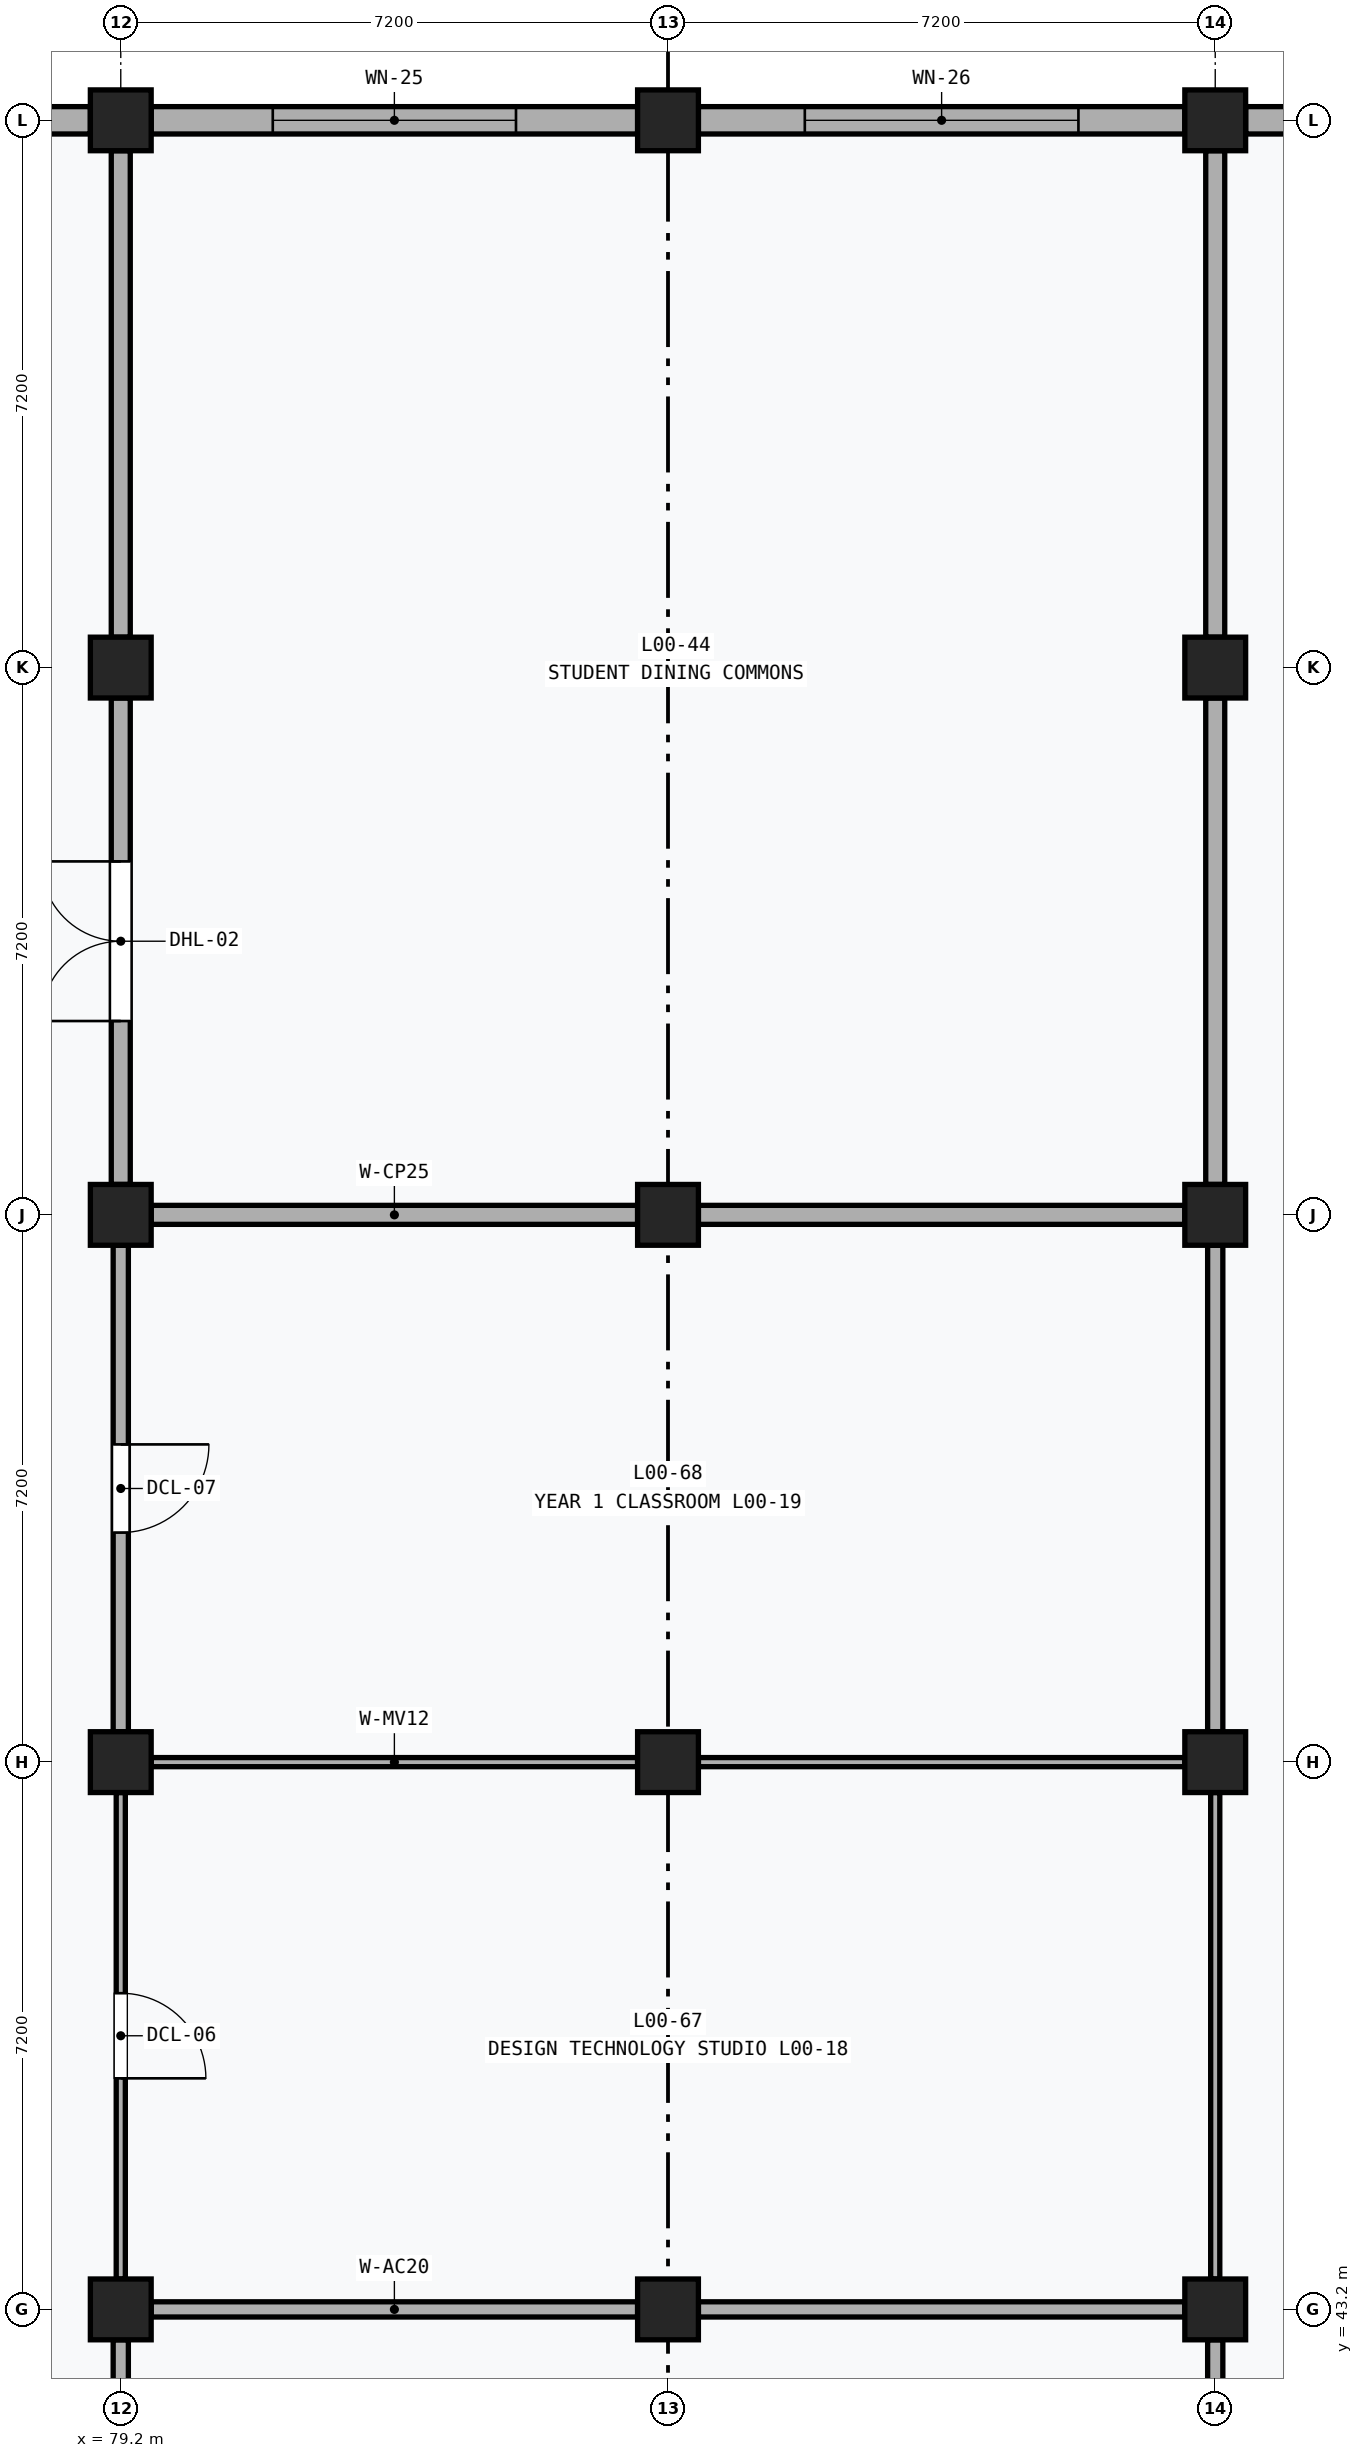
"""IFC4 building model, lengths in metres.
Left out: names, types, materials, properties, quantities, classifications, styles, units other than length and angle.
Written with IfcOpenShell. Run it as: python <this file> out.ifc"""

import sys

from ifc_helpers import new_model, si_unit, direction, frame, frame_2d, origin, origin_2d, place, context, subcontext, project, spatial, rectangle, extrude, element, fill, save


model = new_model("IFC4")
c1 = context("Model", 3, precision=1e-05, world=origin(), true_north=direction((0.0, 1.0)))
c2 = subcontext(c1, "Body", "Model", "MODEL_VIEW")
j1 = project(units=[si_unit("LENGTHUNIT", "METRE"), si_unit("PLANEANGLEUNIT", "RADIAN")], contexts=[c1])
p1 = place(None, origin())
s1 = spatial("IfcSite", under=j1, at=p1, CompositionType="ELEMENT")
p2 = place(p1, origin())
s2 = spatial("IfcBuilding", under=s1, at=p2, CompositionType="ELEMENT")
p3 = place(p2, origin())
s3 = spatial("IfcBuildingStorey", under=s2, at=p3, CompositionType="ELEMENT", Elevation=0.0)
for number, where, z_axis, x_axis in (
    (1, (79.2, 43.2, 0.0), (0.0, 0.0, 1.0), (1.0, 0.0, 0.0)),
    (2, (79.2, 50.4, 0.0), (0.0, 0.0, 1.0), (1.0, 0.0, 0.0)),
    (3, (79.2, 57.6, 0.0), (0.0, 0.0, 1.0), (1.0, 0.0, 0.0)),
    (4, (79.2, 64.8, 0.0), (0.0, 0.0, 1.0), (1.0, 0.0, 0.0)),
    (5, (79.2, 72.0, 0.0), (0.0, 0.0, 1.0), (1.0, 0.0, 0.0)),
    (6, (86.4, 43.2, 0.0), (0.0, 0.0, 1.0), (1.0, 0.0, 0.0)),
    (7, (86.4, 50.4, 0.0), (0.0, 0.0, 1.0), (1.0, 0.0, 0.0)),
    (8, (86.4, 57.6, 0.0), (0.0, 0.0, 1.0), (1.0, 0.0, 0.0)),
    (9, (86.4, 72.0, 0.0), (0.0, 0.0, 1.0), (1.0, 0.0, 0.0)),
    (10, (93.6, 43.2, 0.0), (0.0, 0.0, 1.0), (1.0, 0.0, 0.0)),
    (11, (93.6, 50.4, 0.0), (0.0, 0.0, 1.0), (1.0, 0.0, 0.0)),
    (12, (93.6, 57.6, 0.0), (0.0, 0.0, 1.0), (1.0, 0.0, 0.0)),
    (13, (93.6, 64.8, 0.0), (0.0, 0.0, 1.0), (1.0, 0.0, 0.0)),
    (14, (93.6, 72.0, 0.0), (0.0, 0.0, 1.0), (1.0, 0.0, 0.0)),
):
    element("IfcColumn", number, at=place(p3, frame(where, z_axis=z_axis, x_axis=x_axis)), inside=s3, PredefinedType="COLUMN", context=c2, shape_type="SweptSolid", body=[
        extrude(rectangle(XDim=0.8, YDim=0.8, at=origin_2d()), origin(), (0.0, 0.0, 1.0), 4.8),
    ])
p4 = place(p3, frame((72.25, 72.0, 0.0), z_axis=(0.0, 0.0, 1.0), x_axis=(1.0, 0.0, 0.0)))
e15 = element("IfcWall", 15, at=p4, inside=s3, PredefinedType="SOLIDWALL", context=c2, shape_type="SweptSolid", body=[
    extrude(rectangle(XDim=6.55, YDim=0.36, at=frame_2d((3.275, 0.0))), origin(), (0.0, 0.0, 1.0), 3.89),
])
p5 = place(p4, frame((1.875, 0.0, 0.7)))
e16 = element("IfcOpeningElement", 16, at=p5, cuts=e15, PredefinedType="OPENING", context=c2, shape_type="SweptSolid", body=[
    extrude(rectangle(XDim=2.8, YDim=2.2, at=frame_2d((1.4, 1.1))), frame((0.0, 0.192, 0.0), z_axis=(0.0, -1.0, 0.0), x_axis=(1.0, 0.0, 0.0)), (0.0, 0.0, 1.0), 0.384),
])
p6 = place(p3, frame((79.6, 72.0, 0.0), z_axis=(0.0, 0.0, 1.0), x_axis=(1.0, 0.0, 0.0)))
e17 = element("IfcWall", 17, at=p6, inside=s3, PredefinedType="SOLIDWALL", context=c2, shape_type="SweptSolid", body=[
    extrude(rectangle(XDim=6.4, YDim=0.36, at=frame_2d((3.2, 0.0))), origin(), (0.0, 0.0, 1.0), 3.89),
])
p7 = place(p6, frame((1.6, 0.0, 0.7)))
e18 = element("IfcOpeningElement", 18, at=p7, cuts=e17, PredefinedType="OPENING", context=c2, shape_type="SweptSolid", body=[
    extrude(rectangle(XDim=3.2, YDim=2.2, at=frame_2d((1.6, 1.1))), frame((0.0, 0.192, 0.0), z_axis=(0.0, -1.0, 0.0), x_axis=(1.0, 0.0, 0.0)), (0.0, 0.0, 1.0), 0.384),
])
p8 = place(p3, frame((86.8, 72.0, 0.0), z_axis=(0.0, 0.0, 1.0), x_axis=(1.0, 0.0, 0.0)))
e19 = element("IfcWall", 19, at=p8, inside=s3, PredefinedType="SOLIDWALL", context=c2, shape_type="SweptSolid", body=[
    extrude(rectangle(XDim=6.4, YDim=0.36, at=frame_2d((3.2, 0.0))), origin(), (0.0, 0.0, 1.0), 3.89),
])
p9 = place(p8, frame((1.4, 0.0, 0.7)))
e20 = element("IfcOpeningElement", 20, at=p9, cuts=e19, PredefinedType="OPENING", context=c2, shape_type="SweptSolid", body=[
    extrude(rectangle(XDim=3.6, YDim=2.2, at=frame_2d((1.8, 1.1))), frame((0.0, 0.192, 0.0), z_axis=(0.0, -1.0, 0.0), x_axis=(1.0, 0.0, 0.0)), (0.0, 0.0, 1.0), 0.384),
])
p10 = place(p3, frame((94.0, 72.0, 0.0), z_axis=(0.0, 0.0, 1.0), x_axis=(1.0, 0.0, 0.0)))
e21 = element("IfcWall", 21, at=p10, inside=s3, PredefinedType="SOLIDWALL", context=c2, shape_type="SweptSolid", body=[
    extrude(rectangle(XDim=6.35, YDim=0.36, at=frame_2d((3.175, 0.0))), origin(), (0.0, 0.0, 1.0), 3.89),
])
p11 = place(p10, frame((2.275, 0.0, 0.9)))
e22 = element("IfcOpeningElement", 22, at=p11, cuts=e21, PredefinedType="OPENING", context=c2, shape_type="SweptSolid", body=[
    extrude(rectangle(XDim=1.8, YDim=1.8, at=frame_2d((0.9, 0.9))), frame((0.0, 0.192, 0.0), z_axis=(0.0, -1.0, 0.0), x_axis=(1.0, 0.0, 0.0)), (0.0, 0.0, 1.0), 0.384),
])
p12 = place(p3, frame((79.6, 57.6, 0.0), z_axis=(0.0, 0.0, 1.0), x_axis=(1.0, 0.0, 0.0)))
e23 = element("IfcWall", 23, at=p12, inside=s3, PredefinedType="PARTITIONING", context=c2, shape_type="SweptSolid", body=[
    extrude(rectangle(XDim=6.4, YDim=0.25, at=frame_2d((3.2, 0.0))), origin(), (0.0, 0.0, 1.0), 3.62),
])
p13 = place(p3, frame((79.2, 58.0, 0.0), z_axis=(0.0, 0.0, 1.0), x_axis=(0.0, 1.0, 0.0)))
e24 = element("IfcWall", 24, at=p13, inside=s3, PredefinedType="PARTITIONING", context=c2, shape_type="SweptSolid", body=[
    extrude(rectangle(XDim=6.4, YDim=0.25, at=frame_2d((3.2, 0.0))), origin(), (0.0, 0.0, 1.0), 3.62),
])
p14 = place(p13, frame((2.15, 0.0, 0.0)))
e25 = element("IfcOpeningElement", 25, at=p14, cuts=e24, PredefinedType="OPENING", context=c2, shape_type="SweptSolid", body=[
    extrude(rectangle(XDim=2.1, YDim=2.4, at=frame_2d((1.05, 1.2))), frame((0.0, 0.137, 0.0), z_axis=(0.0, -1.0, 0.0), x_axis=(1.0, 0.0, 0.0)), (0.0, 0.0, 1.0), 0.274),
])
p15 = place(p3, frame((79.2, 65.2, 0.0), z_axis=(0.0, 0.0, 1.0), x_axis=(0.0, 1.0, 0.0)))
e26 = element("IfcWall", 26, at=p15, inside=s3, PredefinedType="PARTITIONING", context=c2, shape_type="SweptSolid", body=[
    extrude(rectangle(XDim=6.4, YDim=0.25, at=frame_2d((3.2, 0.0))), origin(), (0.0, 0.0, 1.0), 3.62),
])
for number, where, z_axis, x_axis in (
    (27, (86.8, 57.6, 0.0), (0.0, 0.0, 1.0), (1.0, 0.0, 0.0)),
    (28, (93.6, 58.0, 0.0), (0.0, 0.0, 1.0), (0.0, 1.0, 0.0)),
):
    element("IfcWall", number, at=place(p3, frame(where, z_axis=z_axis, x_axis=x_axis)), inside=s3, PredefinedType="PARTITIONING", context=c2, shape_type="SweptSolid", body=[
        extrude(rectangle(XDim=6.4, YDim=0.25, at=frame_2d((3.2, 0.0))), origin(), (0.0, 0.0, 1.0), 3.62),
    ])
p16 = place(p3, frame((93.6, 65.2, 0.0), z_axis=(0.0, 0.0, 1.0), x_axis=(0.0, 1.0, 0.0)))
e29 = element("IfcWall", 29, at=p16, inside=s3, PredefinedType="PARTITIONING", context=c2, shape_type="SweptSolid", body=[
    extrude(rectangle(XDim=6.4, YDim=0.25, at=frame_2d((3.2, 0.0))), origin(), (0.0, 0.0, 1.0), 3.62),
])
p17 = place(p3, frame((79.6, 43.2, 0.0), z_axis=(0.0, 0.0, 1.0), x_axis=(1.0, 0.0, 0.0)))
e30 = element("IfcWall", 30, at=p17, inside=s3, PredefinedType="PARTITIONING", context=c2, shape_type="SweptSolid", body=[
    extrude(rectangle(XDim=6.4, YDim=0.2, at=frame_2d((3.2, 0.0))), origin(), (0.0, 0.0, 1.0), 3.62),
])
p18 = place(p3, frame((79.2, 36.4, 0.0), z_axis=(0.0, 0.0, 1.0), x_axis=(0.0, 1.0, 0.0)))
e31 = element("IfcWall", 31, at=p18, inside=s3, PredefinedType="PARTITIONING", context=c2, shape_type="SweptSolid", body=[
    extrude(rectangle(XDim=6.4, YDim=0.2, at=frame_2d((3.2, 0.0))), origin(), (0.0, 0.0, 1.0), 3.62),
])
p19 = place(p18, frame((2.66, 0.0, 0.0)))
e32 = element("IfcOpeningElement", 32, at=p19, cuts=e31, PredefinedType="OPENING", context=c2, shape_type="SweptSolid", body=[
    extrude(rectangle(XDim=1.08, YDim=2.18, at=frame_2d((0.54, 1.09))), frame((0.0, 0.112, 0.0), z_axis=(0.0, -1.0, 0.0), x_axis=(1.0, 0.0, 0.0)), (0.0, 0.0, 1.0), 0.224),
])
p20 = place(p3, frame((86.8, 43.2, 0.0), z_axis=(0.0, 0.0, 1.0), x_axis=(1.0, 0.0, 0.0)))
e33 = element("IfcWall", 33, at=p20, inside=s3, PredefinedType="PARTITIONING", context=c2, shape_type="SweptSolid", body=[
    extrude(rectangle(XDim=6.4, YDim=0.2, at=frame_2d((3.2, 0.0))), origin(), (0.0, 0.0, 1.0), 3.62),
])
p21 = place(p3, frame((93.6, 36.4, 0.0), z_axis=(0.0, 0.0, 1.0), x_axis=(0.0, 1.0, 0.0)))
e34 = element("IfcWall", 34, at=p21, inside=s3, PredefinedType="PARTITIONING", context=c2, shape_type="SweptSolid", body=[
    extrude(rectangle(XDim=6.4, YDim=0.2, at=frame_2d((3.2, 0.0))), origin(), (0.0, 0.0, 1.0), 3.62),
])
p22 = place(p3, frame((79.6, 50.4, 0.0), z_axis=(0.0, 0.0, 1.0), x_axis=(1.0, 0.0, 0.0)))
e35 = element("IfcWall", 35, at=p22, inside=s3, PredefinedType="MOVABLE", context=c2, shape_type="SweptSolid", body=[
    extrude(rectangle(XDim=6.4, YDim=0.12, at=frame_2d((3.2, 0.0))), origin(), (0.0, 0.0, 1.0), 3.62),
])
p23 = place(p3, frame((79.2, 43.6, 0.0), z_axis=(0.0, 0.0, 1.0), x_axis=(0.0, 1.0, 0.0)))
e36 = element("IfcWall", 36, at=p23, inside=s3, PredefinedType="MOVABLE", context=c2, shape_type="SweptSolid", body=[
    extrude(rectangle(XDim=6.4, YDim=0.12, at=frame_2d((3.2, 0.0))), origin(), (0.0, 0.0, 1.0), 3.62),
])
p24 = place(p23, frame((2.64, 0.0, 0.0)))
e37 = element("IfcOpeningElement", 37, at=p24, cuts=e36, PredefinedType="OPENING", context=c2, shape_type="SweptSolid", body=[
    extrude(rectangle(XDim=1.12, YDim=2.2, at=frame_2d((0.56, 1.1))), frame((0.0, 0.072, 0.0), z_axis=(0.0, -1.0, 0.0), x_axis=(1.0, 0.0, 0.0)), (0.0, 0.0, 1.0), 0.144),
])
for number, where, z_axis, x_axis in (
    (38, (86.8, 50.4, 0.0), (0.0, 0.0, 1.0), (1.0, 0.0, 0.0)),
    (39, (93.6, 43.6, 0.0), (0.0, 0.0, 1.0), (0.0, 1.0, 0.0)),
):
    element("IfcWall", number, at=place(p3, frame(where, z_axis=z_axis, x_axis=x_axis)), inside=s3, PredefinedType="MOVABLE", context=c2, shape_type="SweptSolid", body=[
        extrude(rectangle(XDim=6.4, YDim=0.12, at=frame_2d((3.2, 0.0))), origin(), (0.0, 0.0, 1.0), 3.62),
    ])
p25 = place(p3, frame((79.2, 50.8, 0.0), z_axis=(0.0, 0.0, 1.0), x_axis=(0.0, 1.0, 0.0)))
e40 = element("IfcWall", 40, at=p25, inside=s3, PredefinedType="PARTITIONING", context=c2, shape_type="SweptSolid", body=[
    extrude(rectangle(XDim=6.4, YDim=0.2, at=frame_2d((3.2, 0.0))), origin(), (0.0, 0.0, 1.0), 3.62),
])
p26 = place(p25, frame((2.62, 0.0, 0.0)))
e41 = element("IfcOpeningElement", 41, at=p26, cuts=e40, PredefinedType="OPENING", context=c2, shape_type="SweptSolid", body=[
    extrude(rectangle(XDim=1.16, YDim=2.22, at=frame_2d((0.58, 1.11))), frame((0.0, 0.112, 0.0), z_axis=(0.0, -1.0, 0.0), x_axis=(1.0, 0.0, 0.0)), (0.0, 0.0, 1.0), 0.224),
])
p27 = place(p3, frame((93.6, 50.8, 0.0), z_axis=(0.0, 0.0, 1.0), x_axis=(0.0, 1.0, 0.0)))
e42 = element("IfcWall", 42, at=p27, inside=s3, PredefinedType="PARTITIONING", context=c2, shape_type="SweptSolid", body=[
    extrude(rectangle(XDim=6.4, YDim=0.2, at=frame_2d((3.2, 0.0))), origin(), (0.0, 0.0, 1.0), 3.62),
])
p28 = place(p7, origin())
e43 = element("IfcWindow", 43, at=p28, inside=s3, PartitioningType="SINGLE_PANEL", PredefinedType="WINDOW", context=c2, shape_type="SweptSolid", body=[
    extrude(rectangle(XDim=3.2, YDim=2.2, at=frame_2d((1.6, 1.1))), frame((0.0, 0.03, 0.0), z_axis=(0.0, -1.0, 0.0), x_axis=(1.0, 0.0, 0.0)), (0.0, 0.0, 1.0), 0.06),
])
fill(e18, e43)
p29 = place(p9, origin())
e44 = element("IfcWindow", 44, at=p29, inside=s3, PartitioningType="SINGLE_PANEL", PredefinedType="WINDOW", context=c2, shape_type="SweptSolid", body=[
    extrude(rectangle(XDim=3.6, YDim=2.2, at=frame_2d((1.8, 1.1))), frame((0.0, 0.03, 0.0), z_axis=(0.0, -1.0, 0.0), x_axis=(1.0, 0.0, 0.0)), (0.0, 0.0, 1.0), 0.06),
])
fill(e20, e44)
p30 = place(p14, origin())
e45 = element("IfcDoor", 45, at=p30, inside=s3, OperationType="DOUBLE_DOOR_SINGLE_SWING", PredefinedType="DOOR", context=c2, shape_type="SweptSolid", body=[
    extrude(rectangle(XDim=2.1, YDim=2.4, at=frame_2d((1.05, 1.2))), frame((0.0, 0.025, 0.0), z_axis=(0.0, -1.0, 0.0), x_axis=(1.0, 0.0, 0.0)), (0.0, 0.0, 1.0), 0.05),
])
fill(e25, e45)
p31 = place(p24, frame((1.12, 0.0, 0.0), z_axis=(0.0, 0.0, 1.0), x_axis=(-1.0, 0.0, 0.0)))
e46 = element("IfcDoor", 46, at=p31, inside=s3, OperationType="SINGLE_SWING_RIGHT", PredefinedType="DOOR", context=c2, shape_type="SweptSolid", body=[
    extrude(rectangle(XDim=1.12, YDim=2.2, at=frame_2d((0.56, 1.1))), frame((0.0, 0.025, 0.0), z_axis=(0.0, -1.0, 0.0), x_axis=(1.0, 0.0, 0.0)), (0.0, 0.0, 1.0), 0.05),
])
fill(e37, e46)
p32 = place(p26, frame((1.16, 0.0, 0.0), z_axis=(0.0, 0.0, 1.0), x_axis=(-1.0, 0.0, 0.0)))
e47 = element("IfcDoor", 47, at=p32, inside=s3, OperationType="SINGLE_SWING_LEFT", PredefinedType="DOOR", context=c2, shape_type="SweptSolid", body=[
    extrude(rectangle(XDim=1.16, YDim=2.22, at=frame_2d((0.58, 1.11))), frame((0.0, 0.025, 0.0), z_axis=(0.0, -1.0, 0.0), x_axis=(1.0, 0.0, 0.0)), (0.0, 0.0, 1.0), 0.05),
])
fill(e41, e47)
save(model, sys.argv[1])
